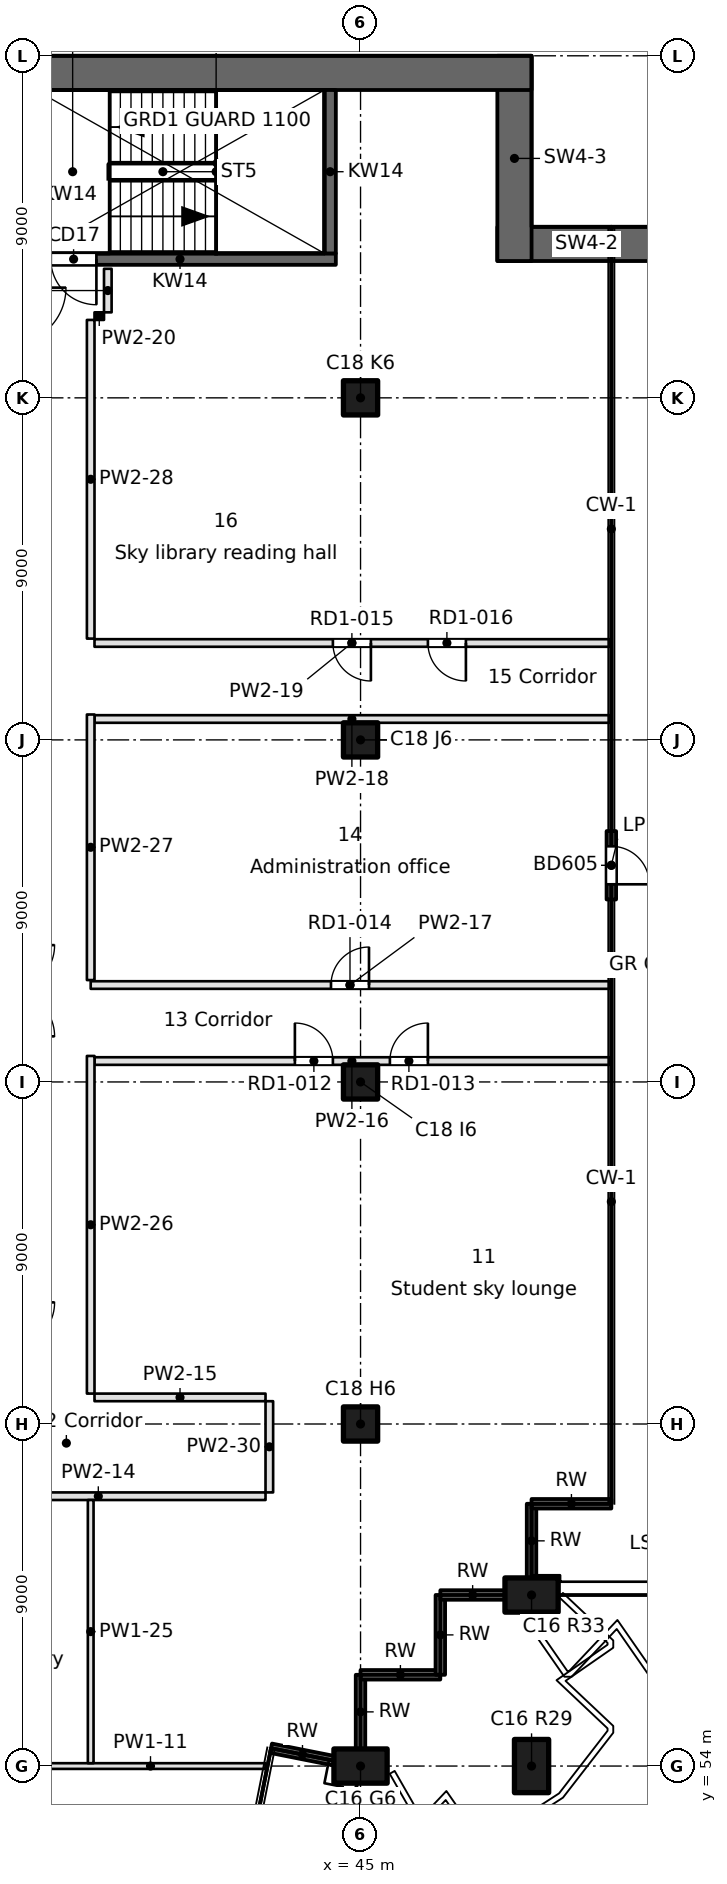
"""IFC4 building model, lengths in metres.
Left out: names, types, materials, properties, quantities, classifications, styles, units other than length and angle.
Written with IfcOpenShell. Run it as: python <this file> out.ifc"""

import sys

from ifc_helpers import new_model, si_unit, direction, frame, frame_2d, origin, origin_2d, place, context, subcontext, project, spatial, rectangle, extrude, element, fill, save


model = new_model("IFC4")
c1 = context("Model", 3, precision=1e-05, world=origin(), true_north=direction((0.0, 1.0)))
c2 = subcontext(c1, "Body", "Model", "MODEL_VIEW")
j1 = project(units=[si_unit("LENGTHUNIT", "METRE"), si_unit("PLANEANGLEUNIT", "RADIAN")], contexts=[c1])
p1 = place(None, origin())
s1 = spatial("IfcSite", under=j1, at=p1, CompositionType="ELEMENT")
p2 = place(p1, origin())
s2 = spatial("IfcBuilding", under=s1, at=p2, CompositionType="ELEMENT")
p3 = place(p2, frame((0.0, 0.0, 280.8)))
s3 = spatial("IfcBuildingStorey", under=s2, at=p3, CompositionType="ELEMENT", Elevation=280.8)
for number, where, z_axis, x_axis in (
    (1, (45.0, 54.0, 0.0), (0.0, 0.0, 1.0), (1.0, 0.0, 0.0)),
    (2, (49.5, 54.0, 0.0), (0.0, 0.0, 1.0), (0.0, 1.0, 0.0)),
    (3, (49.5, 58.5, 0.0), (0.0, 0.0, 1.0), (1.0, 0.0, 0.0)),
):
    element("IfcColumn", number, at=place(p3, frame(where, z_axis=z_axis, x_axis=x_axis)), inside=s3, PredefinedType="COLUMN", context=c2, shape_type="SweptSolid", body=[
        extrude(rectangle(XDim=1.4, YDim=0.9, at=origin_2d()), origin(), (0.0, 0.0, 1.0), 3.7),
    ])
for number, where, z_axis, x_axis in (
    (4, (45.0, 63.0, 0.0), (0.0, 0.0, 1.0), (1.0, 0.0, 0.0)),
    (5, (45.0, 72.0, 0.0), (0.0, 0.0, 1.0), (1.0, 0.0, 0.0)),
    (6, (45.0, 81.0, 0.0), (0.0, 0.0, 1.0), (1.0, 0.0, 0.0)),
    (7, (45.0, 90.0, 0.0), (0.0, 0.0, 1.0), (1.0, 0.0, 0.0)),
):
    element("IfcColumn", number, at=place(p3, frame(where, z_axis=z_axis, x_axis=x_axis)), inside=s3, PredefinedType="COLUMN", context=c2, shape_type="SweptSolid", body=[
        extrude(rectangle(XDim=0.9, YDim=0.9, at=origin_2d()), origin(), (0.0, 0.0, 1.0), 3.7),
    ])
p4 = place(p3, frame((53.3, 94.05, 0.0), z_axis=(0.0, 0.0, 1.0), x_axis=(-1.0, 0.0, 0.0)))
e8 = element("IfcWall", 8, at=p4, inside=s3, PredefinedType="SHEAR", context=c2, shape_type="SweptSolid", body=[
    extrude(rectangle(XDim=4.7, YDim=0.9, at=frame_2d((2.35, 0.0))), origin(), (0.0, 0.0, 1.0), 3.7),
])
p5 = place(p3, frame((49.05, 93.6, 0.0), z_axis=(0.0, 0.0, 1.0), x_axis=(0.0, 1.0, 0.0)))
e9 = element("IfcWall", 9, at=p5, inside=s3, PredefinedType="SHEAR", context=c2, shape_type="SweptSolid", body=[
    extrude(rectangle(XDim=5.4, YDim=0.9, at=frame_2d((2.7, 0.0))), origin(), (0.0, 0.0, 1.0), 3.7),
])
p6 = place(p3, frame((49.5, 98.55, 0.0), z_axis=(0.0, 0.0, 1.0), x_axis=(-1.0, 0.0, 0.0)))
e10 = element("IfcWall", 10, at=p6, inside=s3, PredefinedType="SHEAR", context=c2, shape_type="SweptSolid", body=[
    extrude(rectangle(XDim=45.0, YDim=0.9, at=frame_2d((22.5, 0.0))), origin(), (0.0, 0.0, 1.0), 3.7),
])
p7 = place(p3, frame((42.645, 54.469, 0.0), z_axis=(0.0, 0.0, 1.0), x_axis=(0.980846923473, -0.194780165092, 0.0)))
e11 = element("IfcWall", 11, at=p7, inside=s3, PredefinedType="SOLIDWALL", context=c2, shape_type="SweptSolid", body=[
    extrude(rectangle(XDim=1.687, YDim=0.25, at=frame_2d((0.844, 0.0))), origin(), (0.0, 0.0, 1.0), 3.3),
])
p8 = place(p3, frame((44.999, 54.45, 0.0), z_axis=(0.0, 0.0, 1.0), x_axis=(0.000125156445, 0.999999992168, 0.0)))
e12 = element("IfcWall", 12, at=p8, inside=s3, PredefinedType="SOLIDWALL", context=c2, shape_type="SweptSolid", body=[
    extrude(rectangle(XDim=1.951, YDim=0.25, at=frame_2d((0.975, 0.0))), origin(), (0.0, 0.0, 1.0), 3.3),
])
p9 = place(p3, frame((44.999, 56.401, 0.0), z_axis=(0.0, 0.0, 1.0), x_axis=(0.999999993241, 0.00011626555, 0.0)))
e13 = element("IfcWall", 13, at=p9, inside=s3, PredefinedType="SOLIDWALL", context=c2, shape_type="SweptSolid", body=[
    extrude(rectangle(XDim=2.1, YDim=0.25, at=frame_2d((1.05, 0.0))), origin(), (0.0, 0.0, 1.0), 3.3),
])
p10 = place(p3, frame((47.099, 56.401, 0.0), z_axis=(0.0, 0.0, 1.0), x_axis=(0.000232504063, 0.999999972971, 0.0)))
e14 = element("IfcWall", 14, at=p10, inside=s3, PredefinedType="SOLIDWALL", context=c2, shape_type="SweptSolid", body=[
    extrude(rectangle(XDim=2.1, YDim=0.25, at=frame_2d((1.05, 0.0))), origin(), (0.0, 0.0, 1.0), 3.3),
])
p11 = place(p3, frame((47.1, 58.501, 0.0), z_axis=(0.0, 0.0, 1.0), x_axis=(1.0, 0.0, 0.0)))
e15 = element("IfcWall", 15, at=p11, inside=s3, PredefinedType="SOLIDWALL", context=c2, shape_type="SweptSolid", body=[
    extrude(rectangle(XDim=1.7, YDim=0.25, at=frame_2d((0.85, 0.0))), origin(), (0.0, 0.0, 1.0), 3.3),
])
p12 = place(p3, frame((49.499, 58.95, 0.0), z_axis=(0.0, 0.0, 1.0), x_axis=(0.000250281559, 0.99999996868, 0.0)))
e16 = element("IfcWall", 16, at=p12, inside=s3, PredefinedType="SOLIDWALL", context=c2, shape_type="SweptSolid", body=[
    extrude(rectangle(XDim=1.951, YDim=0.25, at=frame_2d((0.976, 0.0))), origin(), (0.0, 0.0, 1.0), 3.3),
])
p13 = place(p3, frame((49.5, 60.901, 0.0), z_axis=(0.0, 0.0, 1.0), x_axis=(1.0, 0.0, 0.0)))
e17 = element("IfcWall", 17, at=p13, inside=s3, PredefinedType="SOLIDWALL", context=c2, shape_type="SweptSolid", body=[
    extrude(rectangle(XDim=2.1, YDim=0.25, at=frame_2d((1.05, 0.0))), origin(), (0.0, 0.0, 1.0), 3.3),
])
p14 = place(p3, frame((51.599, 76.801, 0.0), z_axis=(0.0, 0.0, 1.0), x_axis=(0.0, 1.0, 0.0)))
e18 = element("IfcWall", 18, at=p14, inside=s3, PredefinedType="SOLIDWALL", context=c2, shape_type="SweptSolid", body=[
    extrude(rectangle(XDim=1.8, YDim=0.25, at=frame_2d((0.9, 0.0))), origin(), (0.0, 0.0, 1.0), 3.3),
])
p15 = place(p14, frame((0.4, 0.0, 0.0)))
e19 = element("IfcOpeningElement", 19, at=p15, cuts=e18, PredefinedType="OPENING", context=c2, shape_type="SweptSolid", body=[
    extrude(rectangle(XDim=1.0, YDim=2.1, at=frame_2d((0.5, 1.05))), frame((0.0, 0.125, 0.0), z_axis=(0.0, -1.0, 0.0), x_axis=(1.0, 0.0, 0.0)), (0.0, 0.0, 1.0), 0.25),
])
p16 = place(p3, frame((36.15, 93.65, -0.4), z_axis=(0.0, 0.0, 1.0), x_axis=(1.0, 0.0, 0.0)))
e20 = element("IfcWall", 20, at=p16, inside=s3, PredefinedType="SOLIDWALL", context=c2, shape_type="SweptSolid", body=[
    extrude(rectangle(XDim=8.2, YDim=0.3, at=frame_2d((4.1, 0.0))), origin(), (0.0, 0.0, 1.0), 3.7),
])
p17 = place(p16, frame((0.7, 0.0, 0.4)))
e21 = element("IfcOpeningElement", 21, at=p17, cuts=e20, PredefinedType="OPENING", context=c2, shape_type="SweptSolid", body=[
    extrude(rectangle(XDim=1.2, YDim=2.1, at=frame_2d((0.6, 1.05))), frame((0.0, 0.15, 0.0), z_axis=(0.0, -1.0, 0.0), x_axis=(1.0, 0.0, 0.0)), (0.0, 0.0, 1.0), 0.3),
])
p18 = place(p3, frame((44.2, 93.8, -0.4), z_axis=(0.0, 0.0, 1.0), x_axis=(0.0, 1.0, 0.0)))
e22 = element("IfcWall", 22, at=p18, inside=s3, PredefinedType="SOLIDWALL", context=c2, shape_type="SweptSolid", body=[
    extrude(rectangle(XDim=4.3, YDim=0.3, at=frame_2d((2.15, 0.0))), origin(), (0.0, 0.0, 1.0), 3.7),
])
p19 = place(p3, frame((36.45, 54.0, 0.0), z_axis=(0.0, 0.0, 1.0), x_axis=(1.0, 0.0, 0.0)))
e23 = element("IfcWall", 23, at=p19, inside=s3, PredefinedType="PARTITIONING", context=c2, shape_type="SweptSolid", body=[
    extrude(rectangle(XDim=6.047, YDim=0.15, at=frame_2d((3.023, 0.0))), origin(), (0.0, 0.0, 1.0), 3.3),
])
p20 = place(p3, frame((42.5, 61.1, 0.0), z_axis=(0.0, 0.0, 1.0), x_axis=(-1.0, 0.0, 0.0)))
e24 = element("IfcWall", 24, at=p20, inside=s3, PredefinedType="PARTITIONING", context=c2, shape_type="SweptSolid", body=[
    extrude(rectangle(XDim=8.8, YDim=0.2, at=frame_2d((4.4, 0.0))), origin(), (0.0, 0.0, 1.0), 3.3),
])
p21 = place(p3, frame((38.0, 63.7, 0.0), z_axis=(0.0, 0.0, 1.0), x_axis=(1.0, 0.0, 0.0)))
e25 = element("IfcWall", 25, at=p21, inside=s3, PredefinedType="PARTITIONING", context=c2, shape_type="SweptSolid", body=[
    extrude(rectangle(XDim=4.5, YDim=0.2, at=frame_2d((2.25, 0.0))), origin(), (0.0, 0.0, 1.0), 3.3),
])
p22 = place(p3, frame((51.545, 72.55, 0.0), z_axis=(0.0, 0.0, 1.0), x_axis=(-1.0, 0.0, 0.0)))
e26 = element("IfcWall", 26, at=p22, inside=s3, PredefinedType="PARTITIONING", context=c2, shape_type="SweptSolid", body=[
    extrude(rectangle(XDim=13.545, YDim=0.2, at=frame_2d((6.772, 0.0))), origin(), (0.0, 0.0, 1.0), 3.3),
])
p23 = place(p22, frame((7.272, 0.0, 0.0)))
e27 = element("IfcOpeningElement", 27, at=p23, cuts=e26, PredefinedType="OPENING", context=c2, shape_type="SweptSolid", body=[
    extrude(rectangle(XDim=1.0, YDim=2.1, at=frame_2d((0.5, 1.05))), frame((0.0, 0.1, 0.0), z_axis=(0.0, -1.0, 0.0), x_axis=(1.0, 0.0, 0.0)), (0.0, 0.0, 1.0), 0.2),
])
p24 = place(p22, frame((4.772, 0.0, 0.0)))
e28 = element("IfcOpeningElement", 28, at=p24, cuts=e26, PredefinedType="OPENING", context=c2, shape_type="SweptSolid", body=[
    extrude(rectangle(XDim=1.0, YDim=2.1, at=frame_2d((0.5, 1.05))), frame((0.0, 0.1, 0.0), z_axis=(0.0, -1.0, 0.0), x_axis=(1.0, 0.0, 0.0)), (0.0, 0.0, 1.0), 0.2),
])
p25 = place(p3, frame((37.9, 74.55, 0.0), z_axis=(0.0, 0.0, 1.0), x_axis=(1.0, 0.0, 0.0)))
e29 = element("IfcWall", 29, at=p25, inside=s3, PredefinedType="PARTITIONING", context=c2, shape_type="SweptSolid", body=[
    extrude(rectangle(XDim=13.645, YDim=0.2, at=frame_2d((6.823, 0.0))), origin(), (0.0, 0.0, 1.0), 3.3),
])
p26 = place(p25, frame((6.323, 0.0, 0.0)))
e30 = element("IfcOpeningElement", 30, at=p26, cuts=e29, PredefinedType="OPENING", context=c2, shape_type="SweptSolid", body=[
    extrude(rectangle(XDim=1.0, YDim=2.1, at=frame_2d((0.5, 1.05))), frame((0.0, 0.1, 0.0), z_axis=(0.0, -1.0, 0.0), x_axis=(1.0, 0.0, 0.0)), (0.0, 0.0, 1.0), 0.2),
])
p27 = place(p3, frame((51.545, 81.55, 0.0), z_axis=(0.0, 0.0, 1.0), x_axis=(-1.0, 0.0, 0.0)))
e31 = element("IfcWall", 31, at=p27, inside=s3, PredefinedType="PARTITIONING", context=c2, shape_type="SweptSolid", body=[
    extrude(rectangle(XDim=13.545, YDim=0.2, at=frame_2d((6.772, 0.0))), origin(), (0.0, 0.0, 1.0), 3.3),
])
p28 = place(p3, frame((38.0, 83.55, 0.0), z_axis=(0.0, 0.0, 1.0), x_axis=(1.0, 0.0, 0.0)))
e32 = element("IfcWall", 32, at=p28, inside=s3, PredefinedType="PARTITIONING", context=c2, shape_type="SweptSolid", body=[
    extrude(rectangle(XDim=13.545, YDim=0.2, at=frame_2d((6.772, 0.0))), origin(), (0.0, 0.0, 1.0), 3.3),
])
p29 = place(p28, frame((6.272, 0.0, 0.0)))
e33 = element("IfcOpeningElement", 33, at=p29, cuts=e32, PredefinedType="OPENING", context=c2, shape_type="SweptSolid", body=[
    extrude(rectangle(XDim=1.0, YDim=2.1, at=frame_2d((0.5, 1.05))), frame((0.0, 0.1, 0.0), z_axis=(0.0, -1.0, 0.0), x_axis=(1.0, 0.0, 0.0)), (0.0, 0.0, 1.0), 0.2),
])
p30 = place(p28, frame((8.772, 0.0, 0.0)))
e34 = element("IfcOpeningElement", 34, at=p30, cuts=e32, PredefinedType="OPENING", context=c2, shape_type="SweptSolid", body=[
    extrude(rectangle(XDim=1.0, YDim=2.1, at=frame_2d((0.5, 1.05))), frame((0.0, 0.1, 0.0), z_axis=(0.0, -1.0, 0.0), x_axis=(1.0, 0.0, 0.0)), (0.0, 0.0, 1.0), 0.2),
])
p31 = place(p3, frame((38.25, 92.15, 0.0), z_axis=(0.0, 0.0, 1.0), x_axis=(-1.0, 0.0, 0.0)))
e35 = element("IfcWall", 35, at=p31, inside=s3, PredefinedType="PARTITIONING", context=c2, shape_type="SweptSolid", body=[
    extrude(rectangle(XDim=0.25, YDim=0.2, at=frame_2d((0.125, 0.0))), origin(), (0.0, 0.0, 1.0), 3.3),
])
p32 = place(p3, frame((37.9, 61.0, 0.0), z_axis=(0.0, 0.0, 1.0), x_axis=(0.0, -1.0, 0.0)))
e36 = element("IfcWall", 36, at=p32, inside=s3, PredefinedType="PARTITIONING", context=c2, shape_type="SweptSolid", body=[
    extrude(rectangle(XDim=6.925, YDim=0.15, at=frame_2d((3.462, 0.0))), origin(), (0.0, 0.0, 1.0), 3.3),
])
p33 = place(p3, frame((37.9, 72.684, 0.0), z_axis=(0.0, 0.0, 1.0), x_axis=(0.0, -1.0, 0.0)))
e37 = element("IfcWall", 37, at=p33, inside=s3, PredefinedType="PARTITIONING", context=c2, shape_type="SweptSolid", body=[
    extrude(rectangle(XDim=8.884, YDim=0.2, at=frame_2d((4.442, 0.0))), origin(), (0.0, 0.0, 1.0), 3.3),
])
p34 = place(p3, frame((37.9, 81.668, 0.0), z_axis=(0.0, 0.0, 1.0), x_axis=(0.0, -1.0, 0.0)))
e38 = element("IfcWall", 38, at=p34, inside=s3, PredefinedType="PARTITIONING", context=c2, shape_type="SweptSolid", body=[
    extrude(rectangle(XDim=6.988, YDim=0.2, at=frame_2d((3.494, 0.0))), origin(), (0.0, 0.0, 1.0), 3.3),
])
p35 = place(p3, frame((37.9, 92.05, 0.0), z_axis=(0.0, 0.0, 1.0), x_axis=(0.0, -1.0, 0.0)))
e39 = element("IfcWall", 39, at=p35, inside=s3, PredefinedType="PARTITIONING", context=c2, shape_type="SweptSolid", body=[
    extrude(rectangle(XDim=8.385, YDim=0.2, at=frame_2d((4.193, 0.0))), origin(), (0.0, 0.0, 1.0), 3.3),
])
p36 = place(p3, frame((38.35, 93.396, 0.0), z_axis=(0.0, 0.0, 1.0), x_axis=(0.0, -1.0, 0.0)))
e40 = element("IfcWall", 40, at=p36, inside=s3, PredefinedType="PARTITIONING", context=c2, shape_type="SweptSolid", body=[
    extrude(rectangle(XDim=1.146, YDim=0.2, at=frame_2d((0.573, 0.0))), origin(), (0.0, 0.0, 1.0), 3.3),
])
p37 = place(p3, frame((42.6, 63.6, 0.0), z_axis=(0.0, 0.0, 1.0), x_axis=(0.0, -1.0, 0.0)))
e41 = element("IfcWall", 41, at=p37, inside=s3, PredefinedType="PARTITIONING", context=c2, shape_type="SweptSolid", body=[
    extrude(rectangle(XDim=2.4, YDim=0.2, at=frame_2d((1.2, 0.0))), origin(), (0.0, 0.0, 1.0), 3.3),
])
p38 = place(p15, frame((1.0, 0.0, 0.0), z_axis=(0.0, 0.0, 1.0), x_axis=(-1.0, 0.0, 0.0)))
e42 = element("IfcDoor", 42, at=p38, inside=s3, OperationType="SINGLE_SWING_RIGHT", PredefinedType="DOOR", context=c2, shape_type="SweptSolid", body=[
    extrude(rectangle(XDim=1.0, YDim=2.1, at=frame_2d((0.5, 1.05))), frame((0.0, 0.025, 0.0), z_axis=(0.0, -1.0, 0.0), x_axis=(1.0, 0.0, 0.0)), (0.0, 0.0, 1.0), 0.05),
])
fill(e19, e42)
p39 = place(p17, frame((1.2, 0.0, 0.0), z_axis=(0.0, 0.0, 1.0), x_axis=(-1.0, 0.0, 0.0)))
e43 = element("IfcDoor", 43, at=p39, inside=s3, OperationType="SINGLE_SWING_LEFT", PredefinedType="DOOR", context=c2, shape_type="SweptSolid", body=[
    extrude(rectangle(XDim=1.2, YDim=2.1, at=frame_2d((0.6, 1.05))), frame((0.0, 0.025, 0.0), z_axis=(0.0, -1.0, 0.0), x_axis=(1.0, 0.0, 0.0)), (0.0, 0.0, 1.0), 0.05),
])
fill(e21, e43)
p40 = place(p23, frame((1.0, 0.0, 0.0), z_axis=(0.0, 0.0, 1.0), x_axis=(-1.0, 0.0, 0.0)))
e44 = element("IfcDoor", 44, at=p40, inside=s3, OperationType="SINGLE_SWING_LEFT", PredefinedType="DOOR", context=c2, shape_type="SweptSolid", body=[
    extrude(rectangle(XDim=1.0, YDim=2.1, at=frame_2d((0.5, 1.05))), frame((0.0, 0.025, 0.0), z_axis=(0.0, -1.0, 0.0), x_axis=(1.0, 0.0, 0.0)), (0.0, 0.0, 1.0), 0.05),
])
fill(e27, e44)
p41 = place(p24, frame((1.0, 0.0, 0.0), z_axis=(0.0, 0.0, 1.0), x_axis=(-1.0, 0.0, 0.0)))
e45 = element("IfcDoor", 45, at=p41, inside=s3, OperationType="SINGLE_SWING_RIGHT", PredefinedType="DOOR", context=c2, shape_type="SweptSolid", body=[
    extrude(rectangle(XDim=1.0, YDim=2.1, at=frame_2d((0.5, 1.05))), frame((0.0, 0.025, 0.0), z_axis=(0.0, -1.0, 0.0), x_axis=(1.0, 0.0, 0.0)), (0.0, 0.0, 1.0), 0.05),
])
fill(e28, e45)
p42 = place(p26, origin())
e46 = element("IfcDoor", 46, at=p42, inside=s3, OperationType="SINGLE_SWING_RIGHT", PredefinedType="DOOR", context=c2, shape_type="SweptSolid", body=[
    extrude(rectangle(XDim=1.0, YDim=2.1, at=frame_2d((0.5, 1.05))), frame((0.0, 0.025, 0.0), z_axis=(0.0, -1.0, 0.0), x_axis=(1.0, 0.0, 0.0)), (0.0, 0.0, 1.0), 0.05),
])
fill(e30, e46)
p43 = place(p29, frame((1.0, 0.0, 0.0), z_axis=(0.0, 0.0, 1.0), x_axis=(-1.0, 0.0, 0.0)))
e47 = element("IfcDoor", 47, at=p43, inside=s3, OperationType="SINGLE_SWING_LEFT", PredefinedType="DOOR", context=c2, shape_type="SweptSolid", body=[
    extrude(rectangle(XDim=1.0, YDim=2.1, at=frame_2d((0.5, 1.05))), frame((0.0, 0.025, 0.0), z_axis=(0.0, -1.0, 0.0), x_axis=(1.0, 0.0, 0.0)), (0.0, 0.0, 1.0), 0.05),
])
fill(e33, e47)
p44 = place(p30, frame((1.0, 0.0, 0.0), z_axis=(0.0, 0.0, 1.0), x_axis=(-1.0, 0.0, 0.0)))
e48 = element("IfcDoor", 48, at=p44, inside=s3, OperationType="SINGLE_SWING_LEFT", PredefinedType="DOOR", context=c2, shape_type="SweptSolid", body=[
    extrude(rectangle(XDim=1.0, YDim=2.1, at=frame_2d((0.5, 1.05))), frame((0.0, 0.025, 0.0), z_axis=(0.0, -1.0, 0.0), x_axis=(1.0, 0.0, 0.0)), (0.0, 0.0, 1.0), 0.05),
])
fill(e34, e48)
save(model, sys.argv[1])
